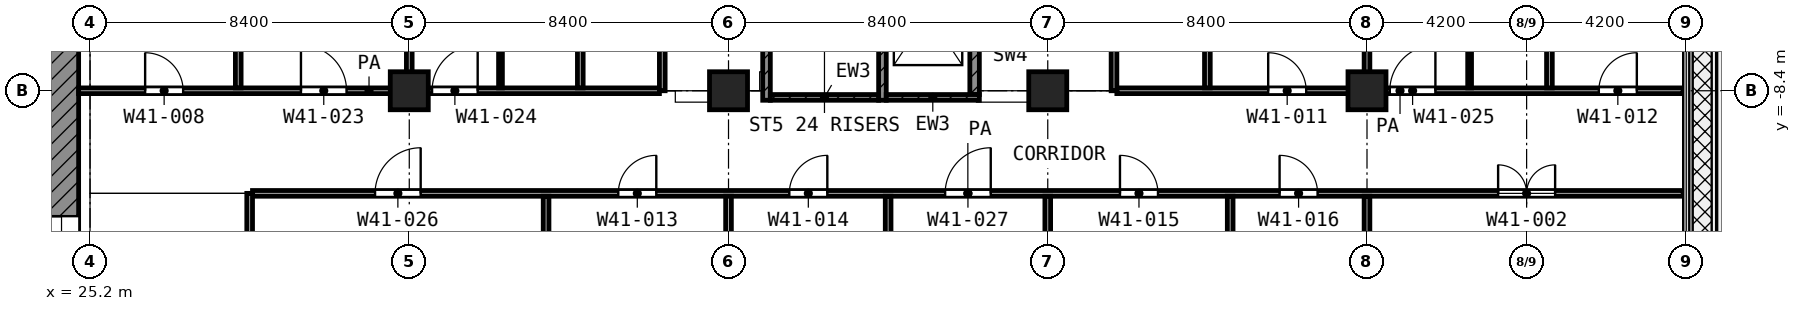
"""IFC4 building model, lengths in metres.
Left out: names, types, materials, properties, quantities, classifications, styles, units other than length and angle.
Written with IfcOpenShell. Run it as: python <this file> out.ifc"""

import sys

from ifc_helpers import new_model, si_unit, direction, frame, frame_2d, origin, origin_2d, place, context, subcontext, project, spatial, rectangle, extrude, element, fill, save


model = new_model("IFC4")
c1 = context("Model", 3, precision=1e-05, world=origin(), true_north=direction((0.0, 1.0)))
c2 = subcontext(c1, "Body", "Model", "MODEL_VIEW")
j1 = project(units=[si_unit("LENGTHUNIT", "METRE"), si_unit("PLANEANGLEUNIT", "RADIAN")], contexts=[c1])
p1 = place(None, origin())
s1 = spatial("IfcSite", under=j1, at=p1, CompositionType="ELEMENT")
p2 = place(p1, origin())
s2 = spatial("IfcBuilding", under=s1, at=p2, CompositionType="ELEMENT")
p3 = place(p2, frame((0.0, 0.0, 179.4)))
s3 = spatial("IfcBuildingStorey", under=s2, at=p3, CompositionType="ELEMENT", Elevation=179.4)
for number, where, z_axis, x_axis in (
    (1, (33.6, -8.4, 0.0), (0.0, 0.0, 1.0), (1.0, 0.0, 0.0)),
    (2, (42.0, -8.4, 0.0), (0.0, 0.0, 1.0), (1.0, 0.0, 0.0)),
    (3, (50.4, -8.4, 0.0), (0.0, 0.0, 1.0), (1.0, 0.0, 0.0)),
    (4, (58.8, -8.4, 0.0), (0.0, 0.0, 1.0), (1.0, 0.0, 0.0)),
):
    element("IfcColumn", number, at=place(p3, frame(where, z_axis=z_axis, x_axis=x_axis)), inside=s3, PredefinedType="COLUMN", context=c2, shape_type="SweptSolid", body=[
        extrude(rectangle(XDim=1.0, YDim=1.0, at=origin_2d()), origin(), (0.0, 0.0, 1.0), 4.2),
    ])
p4 = place(p3, frame((24.45, -24.0, 0.0), z_axis=(0.0, 0.0, 1.0), x_axis=(0.0, 1.0, 0.0)))
e5 = element("IfcWall", 5, at=p4, inside=s3, PredefinedType="SHEAR", context=c2, shape_type="SweptSolid", body=[
    extrude(rectangle(XDim=18.6, YDim=0.9, at=frame_2d((9.3, 0.0))), origin(), (0.0, 0.0, 1.0), 3.6),
])
p5 = place(p4, frame((10.5, 0.0, 0.0)))
e6 = element("IfcOpeningElement", 6, at=p5, cuts=e5, PredefinedType="OPENING", context=c2, shape_type="SweptSolid", body=[
    extrude(rectangle(XDim=1.8, YDim=2.1, at=frame_2d((0.9, 1.05))), frame((0.0, 0.46, 0.0), z_axis=(0.0, -1.0, 0.0), x_axis=(1.0, 0.0, 0.0)), (0.0, 0.0, 1.0), 0.92),
])
p6 = place(p3, frame((43.0, -8.65, 0.0), z_axis=(0.0, 0.0, 1.0), x_axis=(0.0, 1.0, 0.0)))
e7 = element("IfcWall", 7, at=p6, inside=s3, PredefinedType="SHEAR", context=c2, shape_type="SweptSolid", body=[
    extrude(rectangle(XDim=8.35, YDim=0.2, at=frame_2d((4.175, 0.0))), origin(), (0.0, 0.0, 1.0), 3.6),
])
p7 = place(p6, frame((7.0, 0.0, 0.0)))
e8 = element("IfcOpeningElement", 8, at=p7, cuts=e7, PredefinedType="OPENING", context=c2, shape_type="SweptSolid", body=[
    extrude(rectangle(XDim=1.1, YDim=2.1, at=frame_2d((0.55, 1.05))), frame((0.0, 0.11, 0.0), z_axis=(0.0, -1.0, 0.0), x_axis=(1.0, 0.0, 0.0)), (0.0, 0.0, 1.0), 0.22),
])
p8 = place(p3, frame((46.05, -8.65, 0.0), z_axis=(0.0, 0.0, 1.0), x_axis=(0.0, 1.0, 0.0)))
e9 = element("IfcWall", 9, at=p8, inside=s3, PredefinedType="SHEAR", context=c2, shape_type="SweptSolid", body=[
    extrude(rectangle(XDim=8.35, YDim=0.2, at=frame_2d((4.175, 0.0))), origin(), (0.0, 0.0, 1.0), 3.6),
])
p9 = place(p8, frame((7.0, 0.0, 0.0)))
e10 = element("IfcOpeningElement", 10, at=p9, cuts=e9, PredefinedType="OPENING", context=c2, shape_type="SweptSolid", body=[
    extrude(rectangle(XDim=1.1, YDim=2.1, at=frame_2d((0.55, 1.05))), frame((0.0, 0.11, 0.0), z_axis=(0.0, -1.0, 0.0), x_axis=(1.0, 0.0, 0.0)), (0.0, 0.0, 1.0), 0.22),
])
p10 = place(p3, frame((43.1, -8.575, 0.0), z_axis=(0.0, 0.0, 1.0), x_axis=(1.0, 0.0, 0.0)))
e11 = element("IfcWall", 11, at=p10, inside=s3, PredefinedType="SHEAR", context=c2, shape_type="SweptSolid", body=[
    extrude(rectangle(XDim=2.85, YDim=0.15, at=frame_2d((1.425, 0.0))), origin(), (0.0, 0.0, 1.0), 3.6),
])
p11 = place(p3, frame((46.15, -8.575, 0.0), z_axis=(0.0, 0.0, 1.0), x_axis=(1.0, 0.0, 0.0)))
e12 = element("IfcWall", 12, at=p11, inside=s3, PredefinedType="SHEAR", context=c2, shape_type="SweptSolid", body=[
    extrude(rectangle(XDim=2.45, YDim=0.15, at=frame_2d((1.225, 0.0))), origin(), (0.0, 0.0, 1.0), 3.6),
])
p12 = place(p3, frame((48.475, -8.5, 0.0), z_axis=(0.0, 0.0, 1.0), x_axis=(0.0, 1.0, 0.0)))
e13 = element("IfcWall", 13, at=p12, inside=s3, PredefinedType="SHEAR", context=c2, shape_type="SweptSolid", body=[
    extrude(rectangle(XDim=3.475, YDim=0.25, at=frame_2d((1.738, 0.0))), origin(), (0.0, 0.0, 1.0), 3.6),
])
for number, where, z_axis, x_axis in (
    (14, (36.0, -8.325, 0.0), (0.0, 0.0, 1.0), (0.0, 1.0, 0.0)),
    (15, (61.5, -8.325, 0.0), (0.0, 0.0, 1.0), (0.0, 1.0, 0.0)),
):
    element("IfcWall", number, at=place(p3, frame(where, z_axis=z_axis, x_axis=x_axis)), inside=s3, PredefinedType="PARTITIONING", context=c2, shape_type="SweptSolid", body=[
        extrude(rectangle(XDim=2.625, YDim=0.1, at=frame_2d((1.312, 0.0))), origin(), (0.0, 0.0, 1.0), 3.6),
    ])
p13 = place(p3, frame((29.475, -11.1, 0.0), z_axis=(0.0, 0.0, 1.0), x_axis=(1.0, 0.0, 0.0)))
e16 = element("IfcWall", 16, at=p13, inside=s3, PredefinedType="PARTITIONING", context=c2, shape_type="SweptSolid", body=[
    extrude(rectangle(XDim=37.645, YDim=0.15, at=frame_2d((18.823, 0.0))), origin(), (0.0, 0.0, 1.0), 3.6),
])
p14 = place(p13, frame((3.225, 0.0, 0.0)))
e17 = element("IfcOpeningElement", 17, at=p14, cuts=e16, PredefinedType="OPENING", context=c2, shape_type="SweptSolid", body=[
    extrude(rectangle(XDim=1.2, YDim=2.1, at=frame_2d((0.6, 1.05))), frame((0.0, 0.085, 0.0), z_axis=(0.0, -1.0, 0.0), x_axis=(1.0, 0.0, 0.0)), (0.0, 0.0, 1.0), 0.17),
])
p15 = place(p13, frame((9.625, 0.0, 0.0)))
e18 = element("IfcOpeningElement", 18, at=p15, cuts=e16, PredefinedType="OPENING", context=c2, shape_type="SweptSolid", body=[
    extrude(rectangle(XDim=1.0, YDim=2.1, at=frame_2d((0.5, 1.05))), frame((0.0, 0.085, 0.0), z_axis=(0.0, -1.0, 0.0), x_axis=(1.0, 0.0, 0.0)), (0.0, 0.0, 1.0), 0.17),
])
p16 = place(p13, frame((14.125, 0.0, 0.0)))
e19 = element("IfcOpeningElement", 19, at=p16, cuts=e16, PredefinedType="OPENING", context=c2, shape_type="SweptSolid", body=[
    extrude(rectangle(XDim=1.0, YDim=2.1, at=frame_2d((0.5, 1.05))), frame((0.0, 0.085, 0.0), z_axis=(0.0, -1.0, 0.0), x_axis=(1.0, 0.0, 0.0)), (0.0, 0.0, 1.0), 0.17),
])
p17 = place(p13, frame((18.225, 0.0, 0.0)))
e20 = element("IfcOpeningElement", 20, at=p17, cuts=e16, PredefinedType="OPENING", context=c2, shape_type="SweptSolid", body=[
    extrude(rectangle(XDim=1.2, YDim=2.1, at=frame_2d((0.6, 1.05))), frame((0.0, 0.085, 0.0), z_axis=(0.0, -1.0, 0.0), x_axis=(1.0, 0.0, 0.0)), (0.0, 0.0, 1.0), 0.17),
])
p18 = place(p13, frame((22.825, 0.0, 0.0)))
e21 = element("IfcOpeningElement", 21, at=p18, cuts=e16, PredefinedType="OPENING", context=c2, shape_type="SweptSolid", body=[
    extrude(rectangle(XDim=1.0, YDim=2.1, at=frame_2d((0.5, 1.05))), frame((0.0, 0.085, 0.0), z_axis=(0.0, -1.0, 0.0), x_axis=(1.0, 0.0, 0.0)), (0.0, 0.0, 1.0), 0.17),
])
p19 = place(p13, frame((27.025, 0.0, 0.0)))
e22 = element("IfcOpeningElement", 22, at=p19, cuts=e16, PredefinedType="OPENING", context=c2, shape_type="SweptSolid", body=[
    extrude(rectangle(XDim=1.0, YDim=2.1, at=frame_2d((0.5, 1.05))), frame((0.0, 0.085, 0.0), z_axis=(0.0, -1.0, 0.0), x_axis=(1.0, 0.0, 0.0)), (0.0, 0.0, 1.0), 0.17),
])
p20 = place(p13, frame((32.775, 0.0, 0.0)))
e23 = element("IfcOpeningElement", 23, at=p20, cuts=e16, PredefinedType="OPENING", context=c2, shape_type="SweptSolid", body=[
    extrude(rectangle(XDim=1.5, YDim=2.1, at=frame_2d((0.75, 1.05))), frame((0.0, 0.085, 0.0), z_axis=(0.0, -1.0, 0.0), x_axis=(1.0, 0.0, 0.0)), (0.0, 0.0, 1.0), 0.17),
])
p21 = place(p3, frame((24.9, -8.4, 0.0), z_axis=(0.0, 0.0, 1.0), x_axis=(1.0, 0.0, 0.0)))
e24 = element("IfcWall", 24, at=p21, inside=s3, PredefinedType="PARTITIONING", context=c2, shape_type="SweptSolid", body=[
    extrude(rectangle(XDim=15.282, YDim=0.15, at=frame_2d((7.641, 0.0))), origin(), (0.0, 0.0, 1.0), 3.6),
])
p22 = place(p21, frame((1.75, 0.0, 0.0)))
e25 = element("IfcOpeningElement", 25, at=p22, cuts=e24, PredefinedType="OPENING", context=c2, shape_type="SweptSolid", body=[
    extrude(rectangle(XDim=1.0, YDim=2.1, at=frame_2d((0.5, 1.05))), frame((0.0, 0.085, 0.0), z_axis=(0.0, -1.0, 0.0), x_axis=(1.0, 0.0, 0.0)), (0.0, 0.0, 1.0), 0.17),
])
p23 = place(p21, frame((5.85, 0.0, 0.0)))
e26 = element("IfcOpeningElement", 26, at=p23, cuts=e24, PredefinedType="OPENING", context=c2, shape_type="SweptSolid", body=[
    extrude(rectangle(XDim=1.2, YDim=2.1, at=frame_2d((0.6, 1.05))), frame((0.0, 0.085, 0.0), z_axis=(0.0, -1.0, 0.0), x_axis=(1.0, 0.0, 0.0)), (0.0, 0.0, 1.0), 0.17),
])
p24 = place(p21, frame((9.3, 0.0, 0.0)))
e27 = element("IfcOpeningElement", 27, at=p24, cuts=e24, PredefinedType="OPENING", context=c2, shape_type="SweptSolid", body=[
    extrude(rectangle(XDim=1.2, YDim=2.1, at=frame_2d((0.6, 1.05))), frame((0.0, 0.085, 0.0), z_axis=(0.0, -1.0, 0.0), x_axis=(1.0, 0.0, 0.0)), (0.0, 0.0, 1.0), 0.17),
])
p25 = place(p3, frame((52.218, -8.4, 0.0), z_axis=(0.0, 0.0, 1.0), x_axis=(1.0, 0.0, 0.0)))
e28 = element("IfcWall", 28, at=p25, inside=s3, PredefinedType="PARTITIONING", context=c2, shape_type="SweptSolid", body=[
    extrude(rectangle(XDim=14.902, YDim=0.15, at=frame_2d((7.451, 0.0))), origin(), (0.0, 0.0, 1.0), 3.6),
])
p26 = place(p25, frame((3.982, 0.0, 0.0)))
e29 = element("IfcOpeningElement", 29, at=p26, cuts=e28, PredefinedType="OPENING", context=c2, shape_type="SweptSolid", body=[
    extrude(rectangle(XDim=1.0, YDim=2.1, at=frame_2d((0.5, 1.05))), frame((0.0, 0.085, 0.0), z_axis=(0.0, -1.0, 0.0), x_axis=(1.0, 0.0, 0.0)), (0.0, 0.0, 1.0), 0.17),
])
p27 = place(p25, frame((7.182, 0.0, 0.0)))
e30 = element("IfcOpeningElement", 30, at=p27, cuts=e28, PredefinedType="OPENING", context=c2, shape_type="SweptSolid", body=[
    extrude(rectangle(XDim=1.2, YDim=2.1, at=frame_2d((0.6, 1.05))), frame((0.0, 0.085, 0.0), z_axis=(0.0, -1.0, 0.0), x_axis=(1.0, 0.0, 0.0)), (0.0, 0.0, 1.0), 0.17),
])
p28 = place(p25, frame((12.682, 0.0, 0.0)))
e31 = element("IfcOpeningElement", 31, at=p28, cuts=e28, PredefinedType="OPENING", context=c2, shape_type="SweptSolid", body=[
    extrude(rectangle(XDim=1.0, YDim=2.1, at=frame_2d((0.5, 1.05))), frame((0.0, 0.085, 0.0), z_axis=(0.0, -1.0, 0.0), x_axis=(1.0, 0.0, 0.0)), (0.0, 0.0, 1.0), 0.17),
])
p29 = place(p3, frame((29.1, -8.325, 0.0), z_axis=(0.0, 0.0, 1.0), x_axis=(0.0, 1.0, 0.0)))
e32 = element("IfcWall", 32, at=p29, inside=s3, PredefinedType="PARTITIONING", context=c2, shape_type="SweptSolid", body=[
    extrude(rectangle(XDim=8.245, YDim=0.15, at=frame_2d((4.123, 0.0))), origin(), (0.0, 0.0, 1.0), 2.7),
])
p30 = place(p3, frame((29.4, -31.198, 0.0), z_axis=(0.0, 0.0, 1.0), x_axis=(0.0, 1.0, 0.0)))
e33 = element("IfcWall", 33, at=p30, inside=s3, PredefinedType="PARTITIONING", context=c2, shape_type="SweptSolid", body=[
    extrude(rectangle(XDim=20.098, YDim=0.15, at=frame_2d((10.049, 0.0))), origin(), (0.0, 0.0, 1.0), 3.6),
])
p31 = place(p3, frame((33.6, -8.325, 0.0), z_axis=(0.0, 0.0, 1.0), x_axis=(0.0, 1.0, 0.0)))
e34 = element("IfcWall", 34, at=p31, inside=s3, PredefinedType="PARTITIONING", context=c2, shape_type="SweptSolid", body=[
    extrude(rectangle(XDim=8.245, YDim=0.15, at=frame_2d((4.123, 0.0))), origin(), (0.0, 0.0, 1.0), 3.6),
])
p32 = place(p3, frame((37.2, -31.12, 0.0), z_axis=(0.0, 0.0, 1.0), x_axis=(0.0, 1.0, 0.0)))
e35 = element("IfcWall", 35, at=p32, inside=s3, PredefinedType="PARTITIONING", context=c2, shape_type="SweptSolid", body=[
    extrude(rectangle(XDim=19.945, YDim=0.15, at=frame_2d((9.973, 0.0))), origin(), (0.0, 0.0, 1.0), 3.6),
])
p33 = place(p3, frame((38.1, -8.325, 0.0), z_axis=(0.0, 0.0, 1.0), x_axis=(0.0, 1.0, 0.0)))
e36 = element("IfcWall", 36, at=p33, inside=s3, PredefinedType="PARTITIONING", context=c2, shape_type="SweptSolid", body=[
    extrude(rectangle(XDim=8.245, YDim=0.15, at=frame_2d((4.123, 0.0))), origin(), (0.0, 0.0, 1.0), 2.7),
])
p34 = place(p3, frame((40.257, -8.4, 0.0), z_axis=(0.0, 0.0, 1.0), x_axis=(0.0, 1.0, 0.0)))
e37 = element("IfcWall", 37, at=p34, inside=s3, PredefinedType="PARTITIONING", context=c2, shape_type="SweptSolid", body=[
    extrude(rectangle(XDim=8.048, YDim=0.15, at=frame_2d((4.024, 0.0))), origin(), (0.0, 0.0, 1.0), 3.6),
])
p35 = place(p34, frame((3.574, 0.0, 0.0)))
e38 = element("IfcOpeningElement", 38, at=p35, cuts=e37, PredefinedType="OPENING", context=c2, shape_type="SweptSolid", body=[
    extrude(rectangle(XDim=0.9, YDim=2.1, at=frame_2d((0.45, 1.05))), frame((0.0, 0.085, 0.0), z_axis=(0.0, -1.0, 0.0), x_axis=(1.0, 0.0, 0.0)), (0.0, 0.0, 1.0), 0.17),
])
for number, where, z_axis, x_axis in (
    (39, (42.0, -31.12, 0.0), (0.0, 0.0, 1.0), (0.0, 1.0, 0.0)),
    (40, (46.2, -31.12, 0.0), (0.0, 0.0, 1.0), (0.0, 1.0, 0.0)),
    (41, (50.4, -31.12, 0.0), (0.0, 0.0, 1.0), (0.0, 1.0, 0.0)),
):
    element("IfcWall", number, at=place(p3, frame(where, z_axis=z_axis, x_axis=x_axis)), inside=s3, PredefinedType="PARTITIONING", context=c2, shape_type="SweptSolid", body=[
        extrude(rectangle(XDim=19.945, YDim=0.15, at=frame_2d((9.973, 0.0))), origin(), (0.0, 0.0, 1.0), 3.6),
    ])
p36 = place(p3, frame((52.143, -8.4, 0.0), z_axis=(0.0, 0.0, 1.0), x_axis=(0.0, 1.0, 0.0)))
e42 = element("IfcWall", 42, at=p36, inside=s3, PredefinedType="PARTITIONING", context=c2, shape_type="SweptSolid", body=[
    extrude(rectangle(XDim=6.549, YDim=0.15, at=frame_2d((3.274, 0.0))), origin(), (0.0, 0.0, 1.0), 3.6),
])
p37 = place(p36, frame((2.774, 0.0, 0.0)))
e43 = element("IfcOpeningElement", 43, at=p37, cuts=e42, PredefinedType="OPENING", context=c2, shape_type="SweptSolid", body=[
    extrude(rectangle(XDim=1.0, YDim=2.1, at=frame_2d((0.5, 1.05))), frame((0.0, 0.085, 0.0), z_axis=(0.0, -1.0, 0.0), x_axis=(1.0, 0.0, 0.0)), (0.0, 0.0, 1.0), 0.17),
])
p38 = place(p3, frame((54.6, -8.325, 0.0), z_axis=(0.0, 0.0, 1.0), x_axis=(0.0, 1.0, 0.0)))
e44 = element("IfcWall", 44, at=p38, inside=s3, PredefinedType="PARTITIONING", context=c2, shape_type="SweptSolid", body=[
    extrude(rectangle(XDim=8.245, YDim=0.15, at=frame_2d((4.123, 0.0))), origin(), (0.0, 0.0, 1.0), 2.7),
])
for number, where, z_axis, x_axis in (
    (45, (55.2, -31.12, 0.0), (0.0, 0.0, 1.0), (0.0, 1.0, 0.0)),
    (46, (58.8, -31.12, 0.0), (0.0, 0.0, 1.0), (0.0, 1.0, 0.0)),
):
    element("IfcWall", number, at=place(p3, frame(where, z_axis=z_axis, x_axis=x_axis)), inside=s3, PredefinedType="PARTITIONING", context=c2, shape_type="SweptSolid", body=[
        extrude(rectangle(XDim=19.945, YDim=0.15, at=frame_2d((9.973, 0.0))), origin(), (0.0, 0.0, 1.0), 3.6),
    ])
p39 = place(p3, frame((58.8, -8.325, 0.0), z_axis=(0.0, 0.0, 1.0), x_axis=(0.0, 1.0, 0.0)))
e47 = element("IfcWall", 47, at=p39, inside=s3, PredefinedType="PARTITIONING", context=c2, shape_type="SweptSolid", body=[
    extrude(rectangle(XDim=8.245, YDim=0.15, at=frame_2d((4.123, 0.0))), origin(), (0.0, 0.0, 1.0), 2.7),
])
p40 = place(p3, frame((63.6, -8.325, 0.0), z_axis=(0.0, 0.0, 1.0), x_axis=(0.0, 1.0, 0.0)))
e48 = element("IfcWall", 48, at=p40, inside=s3, PredefinedType="PARTITIONING", context=c2, shape_type="SweptSolid", body=[
    extrude(rectangle(XDim=5.812, YDim=0.15, at=frame_2d((2.906, 0.0))), origin(), (0.0, 0.0, 1.0), 2.7),
])
p41 = place(p5, origin())
e49 = element("IfcDoor", 49, at=p41, inside=s3, OperationType="DOUBLE_DOOR_SINGLE_SWING", PredefinedType="DOOR", context=c2, shape_type="SweptSolid", body=[
    extrude(rectangle(XDim=1.8, YDim=2.1, at=frame_2d((0.9, 1.05))), frame((0.0, 0.025, 0.0), z_axis=(0.0, -1.0, 0.0), x_axis=(1.0, 0.0, 0.0)), (0.0, 0.0, 1.0), 0.05),
])
fill(e6, e49)
p42 = place(p22, origin())
e50 = element("IfcDoor", 50, at=p42, inside=s3, OperationType="SINGLE_SWING_LEFT", PredefinedType="DOOR", context=c2, shape_type="SweptSolid", body=[
    extrude(rectangle(XDim=1.0, YDim=2.1, at=frame_2d((0.5, 1.05))), frame((0.0, 0.025, 0.0), z_axis=(0.0, -1.0, 0.0), x_axis=(1.0, 0.0, 0.0)), (0.0, 0.0, 1.0), 0.05),
])
fill(e25, e50)
p43 = place(p23, origin())
e51 = element("IfcDoor", 51, at=p43, inside=s3, OperationType="SINGLE_SWING_LEFT", PredefinedType="DOOR", context=c2, shape_type="SweptSolid", body=[
    extrude(rectangle(XDim=1.2, YDim=2.1, at=frame_2d((0.6, 1.05))), frame((0.0, 0.025, 0.0), z_axis=(0.0, -1.0, 0.0), x_axis=(1.0, 0.0, 0.0)), (0.0, 0.0, 1.0), 0.05),
])
fill(e26, e51)
p44 = place(p24, origin())
e52 = element("IfcDoor", 52, at=p44, inside=s3, OperationType="SINGLE_SWING_RIGHT", PredefinedType="DOOR", context=c2, shape_type="SweptSolid", body=[
    extrude(rectangle(XDim=1.2, YDim=2.1, at=frame_2d((0.6, 1.05))), frame((0.0, 0.025, 0.0), z_axis=(0.0, -1.0, 0.0), x_axis=(1.0, 0.0, 0.0)), (0.0, 0.0, 1.0), 0.05),
])
fill(e27, e52)
p45 = place(p26, origin())
e53 = element("IfcDoor", 53, at=p45, inside=s3, OperationType="SINGLE_SWING_LEFT", PredefinedType="DOOR", context=c2, shape_type="SweptSolid", body=[
    extrude(rectangle(XDim=1.0, YDim=2.1, at=frame_2d((0.5, 1.05))), frame((0.0, 0.025, 0.0), z_axis=(0.0, -1.0, 0.0), x_axis=(1.0, 0.0, 0.0)), (0.0, 0.0, 1.0), 0.05),
])
fill(e29, e53)
p46 = place(p27, origin())
e54 = element("IfcDoor", 54, at=p46, inside=s3, OperationType="SINGLE_SWING_RIGHT", PredefinedType="DOOR", context=c2, shape_type="SweptSolid", body=[
    extrude(rectangle(XDim=1.2, YDim=2.1, at=frame_2d((0.6, 1.05))), frame((0.0, 0.025, 0.0), z_axis=(0.0, -1.0, 0.0), x_axis=(1.0, 0.0, 0.0)), (0.0, 0.0, 1.0), 0.05),
])
fill(e30, e54)
p47 = place(p28, origin())
e55 = element("IfcDoor", 55, at=p47, inside=s3, OperationType="SINGLE_SWING_RIGHT", PredefinedType="DOOR", context=c2, shape_type="SweptSolid", body=[
    extrude(rectangle(XDim=1.0, YDim=2.1, at=frame_2d((0.5, 1.05))), frame((0.0, 0.025, 0.0), z_axis=(0.0, -1.0, 0.0), x_axis=(1.0, 0.0, 0.0)), (0.0, 0.0, 1.0), 0.05),
])
fill(e31, e55)
p48 = place(p14, origin())
e56 = element("IfcDoor", 56, at=p48, inside=s3, OperationType="SINGLE_SWING_RIGHT", PredefinedType="DOOR", context=c2, shape_type="SweptSolid", body=[
    extrude(rectangle(XDim=1.2, YDim=2.1, at=frame_2d((0.6, 1.05))), frame((0.0, 0.025, 0.0), z_axis=(0.0, -1.0, 0.0), x_axis=(1.0, 0.0, 0.0)), (0.0, 0.0, 1.0), 0.05),
])
fill(e17, e56)
p49 = place(p15, origin())
e57 = element("IfcDoor", 57, at=p49, inside=s3, OperationType="SINGLE_SWING_RIGHT", PredefinedType="DOOR", context=c2, shape_type="SweptSolid", body=[
    extrude(rectangle(XDim=1.0, YDim=2.1, at=frame_2d((0.5, 1.05))), frame((0.0, 0.025, 0.0), z_axis=(0.0, -1.0, 0.0), x_axis=(1.0, 0.0, 0.0)), (0.0, 0.0, 1.0), 0.05),
])
fill(e18, e57)
p50 = place(p16, origin())
e58 = element("IfcDoor", 58, at=p50, inside=s3, OperationType="SINGLE_SWING_RIGHT", PredefinedType="DOOR", context=c2, shape_type="SweptSolid", body=[
    extrude(rectangle(XDim=1.0, YDim=2.1, at=frame_2d((0.5, 1.05))), frame((0.0, 0.025, 0.0), z_axis=(0.0, -1.0, 0.0), x_axis=(1.0, 0.0, 0.0)), (0.0, 0.0, 1.0), 0.05),
])
fill(e19, e58)
p51 = place(p17, origin())
e59 = element("IfcDoor", 59, at=p51, inside=s3, OperationType="SINGLE_SWING_RIGHT", PredefinedType="DOOR", context=c2, shape_type="SweptSolid", body=[
    extrude(rectangle(XDim=1.2, YDim=2.1, at=frame_2d((0.6, 1.05))), frame((0.0, 0.025, 0.0), z_axis=(0.0, -1.0, 0.0), x_axis=(1.0, 0.0, 0.0)), (0.0, 0.0, 1.0), 0.05),
])
fill(e20, e59)
p52 = place(p18, origin())
e60 = element("IfcDoor", 60, at=p52, inside=s3, OperationType="SINGLE_SWING_LEFT", PredefinedType="DOOR", context=c2, shape_type="SweptSolid", body=[
    extrude(rectangle(XDim=1.0, YDim=2.1, at=frame_2d((0.5, 1.05))), frame((0.0, 0.025, 0.0), z_axis=(0.0, -1.0, 0.0), x_axis=(1.0, 0.0, 0.0)), (0.0, 0.0, 1.0), 0.05),
])
fill(e21, e60)
p53 = place(p19, origin())
e61 = element("IfcDoor", 61, at=p53, inside=s3, OperationType="SINGLE_SWING_LEFT", PredefinedType="DOOR", context=c2, shape_type="SweptSolid", body=[
    extrude(rectangle(XDim=1.0, YDim=2.1, at=frame_2d((0.5, 1.05))), frame((0.0, 0.025, 0.0), z_axis=(0.0, -1.0, 0.0), x_axis=(1.0, 0.0, 0.0)), (0.0, 0.0, 1.0), 0.05),
])
fill(e22, e61)
p54 = place(p20, origin())
e62 = element("IfcDoor", 62, at=p54, inside=s3, OperationType="DOUBLE_DOOR_SINGLE_SWING", PredefinedType="DOOR", context=c2, shape_type="SweptSolid", body=[
    extrude(rectangle(XDim=1.5, YDim=2.1, at=frame_2d((0.75, 1.05))), frame((0.0, 0.025, 0.0), z_axis=(0.0, -1.0, 0.0), x_axis=(1.0, 0.0, 0.0)), (0.0, 0.0, 1.0), 0.05),
])
fill(e23, e62)
save(model, sys.argv[1])
